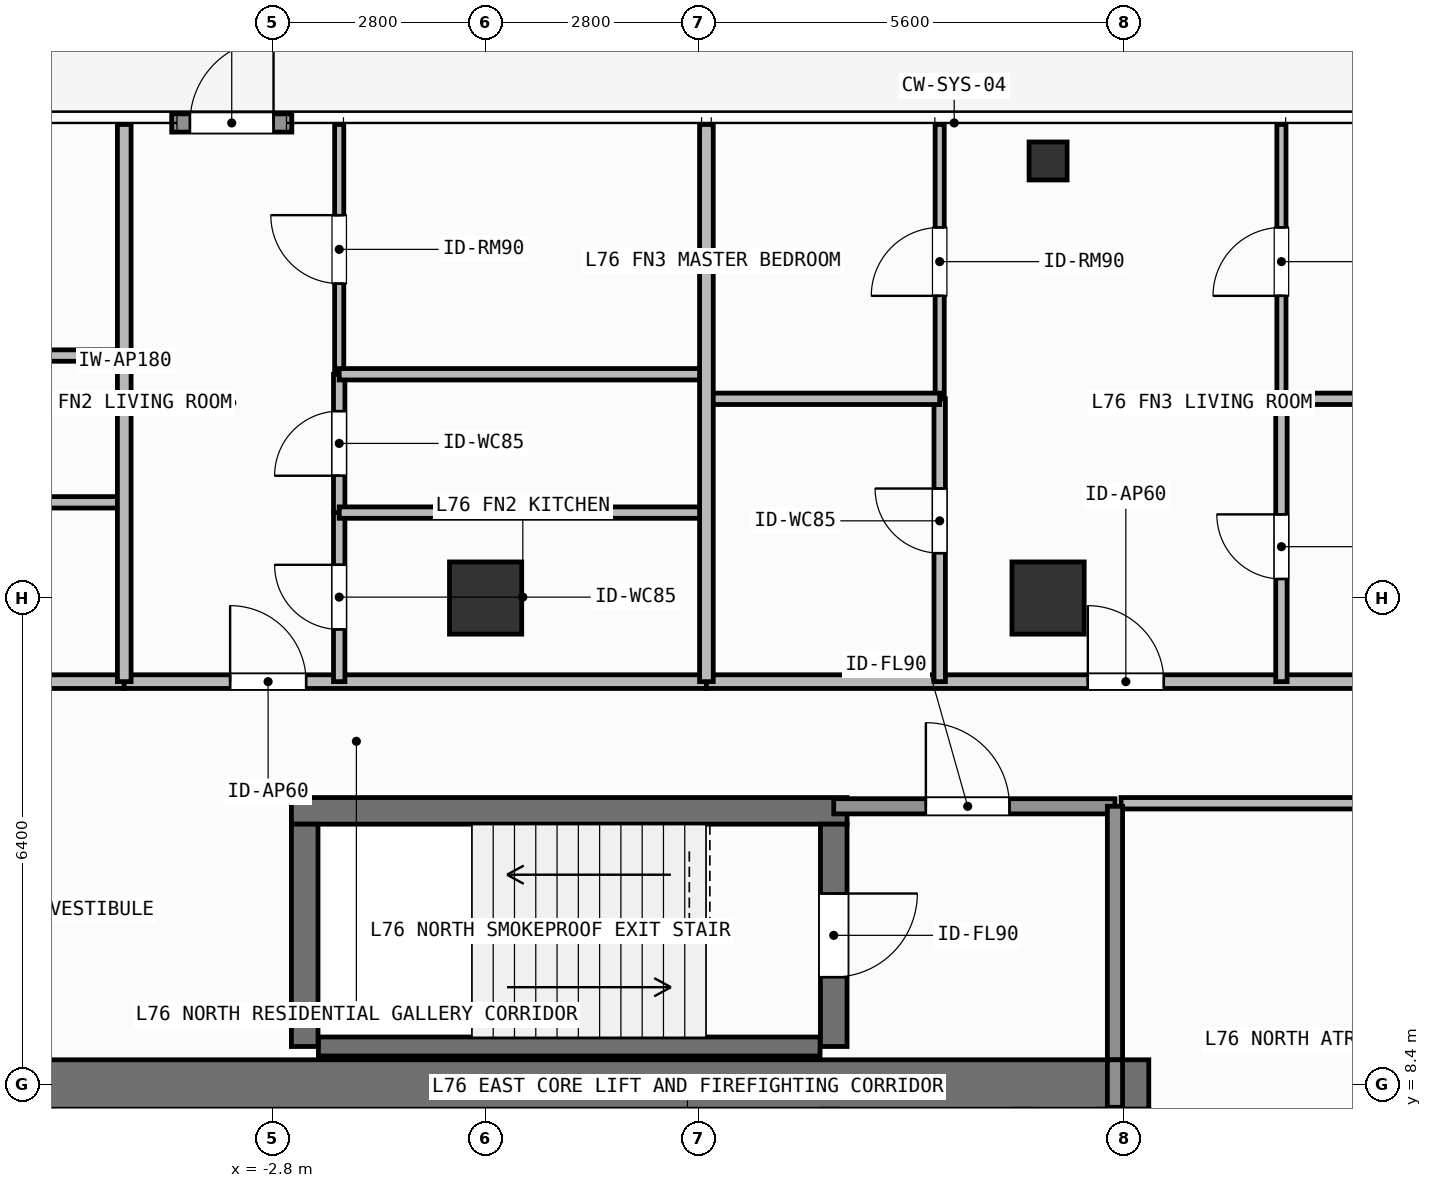
"""IFC4 building model, lengths in metres.
Left out: names, types, materials, properties, quantities, classifications, styles, units other than length and angle.
Written with IfcOpenShell. Run it as: python <this file> out.ifc"""

import sys

from ifc_helpers import new_model, si_unit, direction, frame, frame_2d, origin, origin_2d, place, context, subcontext, project, spatial, rectangle, hollow_rectangle, extrude, element, fill, save


model = new_model("IFC4")
c1 = context("Model", 3, precision=1e-05, world=origin(), true_north=direction((0.0, 1.0)))
c2 = subcontext(c1, "Body", "Model", "MODEL_VIEW")
j1 = project(units=[si_unit("LENGTHUNIT", "METRE"), si_unit("PLANEANGLEUNIT", "RADIAN")], contexts=[c1])
p1 = place(None, origin())
s1 = spatial("IfcSite", under=j1, at=p1, CompositionType="ELEMENT")
p2 = place(p1, origin())
s2 = spatial("IfcBuilding", under=s1, at=p2, CompositionType="ELEMENT")
p3 = place(p2, frame((0.0, 0.0, 309.3)))
s3 = spatial("IfcBuildingStorey", under=s2, at=p3, CompositionType="ELEMENT", Elevation=309.3)
p4 = place(p3, frame((-7.55, 8.4, 0.0), z_axis=(0.0, 0.0, 1.0), x_axis=(1.0, 0.0, 0.0)))
e1 = element("IfcWall", 1, at=p4, inside=s3, PredefinedType="SHEAR", context=c2, shape_type="SweptSolid", body=[
    extrude(rectangle(XDim=16.275, YDim=0.65, at=frame_2d((8.138, 0.0))), origin(), (0.0, 0.0, 1.0), 3.9),
])
p5 = place(p3, frame((-2.555, 12.0, 0.0), z_axis=(0.0, 0.0, 1.0), x_axis=(1.0, 0.0, 0.0)))
e2 = element("IfcWall", 2, at=p5, inside=s3, PredefinedType="SHEAR", context=c2, shape_type="SweptSolid", body=[
    extrude(rectangle(XDim=7.31, YDim=0.35, at=frame_2d((3.655, 0.0))), origin(), (0.0, 0.0, 1.0), 3.9),
])
p6 = place(p3, frame((-2.2, 8.9, 0.0), z_axis=(0.0, 0.0, 1.0), x_axis=(1.0, 0.0, 0.0)))
e3 = element("IfcWall", 3, at=p6, inside=s3, PredefinedType="SHEAR", context=c2, shape_type="SweptSolid", body=[
    extrude(rectangle(XDim=6.6, YDim=0.25, at=frame_2d((3.3, 0.0))), origin(), (0.0, 0.0, 1.0), 3.9),
])
p7 = place(p3, frame((-2.38, 8.9, 0.0), z_axis=(0.0, 0.0, 1.0), x_axis=(0.0, 1.0, 0.0)))
e4 = element("IfcWall", 4, at=p7, inside=s3, PredefinedType="SHEAR", context=c2, shape_type="SweptSolid", body=[
    extrude(rectangle(XDim=2.925, YDim=0.35, at=frame_2d((1.462, 0.0))), origin(), (0.0, 0.0, 1.0), 3.9),
])
p8 = place(p3, frame((4.58, 11.825, 0.0), z_axis=(0.0, 0.0, 1.0), x_axis=(0.0, -1.0, 0.0)))
e5 = element("IfcWall", 5, at=p8, inside=s3, PredefinedType="SHEAR", context=c2, shape_type="SweptSolid", body=[
    extrude(rectangle(XDim=2.925, YDim=0.35, at=frame_2d((1.462, 0.0))), origin(), (0.0, 0.0, 1.0), 3.9),
])
p9 = place(p8, frame((0.913, 0.0, 0.0)))
e6 = element("IfcOpeningElement", 6, at=p9, cuts=e5, PredefinedType="OPENING", context=c2, shape_type="SweptSolid", body=[
    extrude(rectangle(XDim=1.1, YDim=2.15, at=frame_2d((0.55, 1.075))), frame((0.0, 0.185, 0.0), z_axis=(0.0, -1.0, 0.0), x_axis=(1.0, 0.0, 0.0)), (0.0, 0.0, 1.0), 0.37),
])
for number, where, z_axis, x_axis in (
    (7, (0.0, 14.8, 0.0), (0.0, 0.0, 1.0), (1.0, 0.0, 0.0)),
    (8, (7.4, 14.8, 0.0), (0.0, 0.0, 1.0), (1.0, 0.0, 0.0)),
):
    element("IfcColumn", number, at=place(p3, frame(where, z_axis=z_axis, x_axis=x_axis)), inside=s3, PredefinedType="COLUMN", context=c2, shape_type="SweptSolid", body=[
        extrude(rectangle(XDim=0.95, YDim=0.95, at=origin_2d()), origin(), (0.0, 0.0, 1.0), 3.9),
    ])
p10 = place(p3, frame((7.4, 20.55, 0.0), z_axis=(0.0, 0.0, 1.0), x_axis=(1.0, 0.0, 0.0)))
e9 = element("IfcColumn", 9, at=p10, inside=s3, PredefinedType="COLUMN", context=c2, shape_type="SweptSolid", body=[
    extrude(hollow_rectangle(XDim=0.5, YDim=0.5, WallThickness=0.025, at=origin_2d()), origin(), (0.0, 0.0, 1.0), 3.9),
])
p11 = place(p3, frame((-4.13, 21.05, 0.0), z_axis=(0.0, 0.0, 1.0), x_axis=(1.0, 0.0, 0.0)))
e10 = element("IfcWall", 10, at=p11, inside=s3, PredefinedType="SOLIDWALL", context=c2, shape_type="SweptSolid", body=[
    extrude(rectangle(XDim=1.58, YDim=0.24, at=frame_2d((0.79, 0.0))), origin(), (0.0, 0.0, 1.0), 3.64),
])
p12 = place(p11, frame((0.24, 0.0, 0.0)))
e11 = element("IfcOpeningElement", 11, at=p12, cuts=e10, PredefinedType="OPENING", context=c2, shape_type="SweptSolid", body=[
    extrude(rectangle(XDim=1.1, YDim=2.2, at=frame_2d((0.55, 1.1))), frame((0.0, 0.13, 0.0), z_axis=(0.0, -1.0, 0.0), x_axis=(1.0, 0.0, 0.0)), (0.0, 0.0, 1.0), 0.26),
])
p13 = place(p3, frame((4.58, 12.06, 0.0), z_axis=(0.0, 0.0, 1.0), x_axis=(1.0, 0.0, 0.0)))
e12 = element("IfcWall", 12, at=p13, inside=s3, PredefinedType="SOLIDWALL", context=c2, shape_type="SweptSolid", body=[
    extrude(rectangle(XDim=3.7, YDim=0.2, at=frame_2d((1.85, 0.0))), origin(), (0.0, 0.0, 1.0), 3.64),
])
p14 = place(p13, frame((1.212, 0.0, 0.0)))
e13 = element("IfcOpeningElement", 13, at=p14, cuts=e12, PredefinedType="OPENING", context=c2, shape_type="SweptSolid", body=[
    extrude(rectangle(XDim=1.1, YDim=2.15, at=frame_2d((0.55, 1.075))), frame((0.0, 0.11, 0.0), z_axis=(0.0, -1.0, 0.0), x_axis=(1.0, 0.0, 0.0)), (0.0, 0.0, 1.0), 0.22),
])
p15 = place(p3, frame((8.36, 12.1, 0.0), z_axis=(0.0, 0.0, 1.0), x_axis=(1.0, 0.0, 0.0)))
e14 = element("IfcWall", 14, at=p15, inside=s3, PredefinedType="PARTITIONING", context=c2, shape_type="SweptSolid", body=[
    extrude(rectangle(XDim=7.22, YDim=0.15, at=frame_2d((3.61, 0.0))), origin(), (0.0, 0.0, 1.0), 3.64),
])
p16 = place(p15, frame((3.513, 0.0, 0.0)))
e15 = element("IfcOpeningElement", 15, at=p16, cuts=e14, PredefinedType="OPENING", context=c2, shape_type="SweptSolid", body=[
    extrude(rectangle(XDim=0.9, YDim=2.1, at=frame_2d((0.45, 1.05))), frame((0.0, 0.085, 0.0), z_axis=(0.0, -1.0, 0.0), x_axis=(1.0, 0.0, 0.0)), (0.0, 0.0, 1.0), 0.17),
])
p17 = place(p3, frame((-19.32, 13.7, 0.0), z_axis=(0.0, 0.0, 1.0), x_axis=(1.0, 0.0, 0.0)))
e16 = element("IfcWall", 16, at=p17, inside=s3, PredefinedType="PARTITIONING", context=c2, shape_type="SweptSolid", body=[
    extrude(rectangle(XDim=14.566, YDim=0.18, at=frame_2d((7.283, 0.0))), origin(), (0.0, 0.0, 1.0), 3.64),
])
p18 = place(p17, frame((2.845, 0.0, 0.0)))
e17 = element("IfcOpeningElement", 17, at=p18, cuts=e16, PredefinedType="OPENING", context=c2, shape_type="SweptSolid", body=[
    extrude(rectangle(XDim=1.0, YDim=2.2, at=frame_2d((0.5, 1.1))), frame((0.0, 0.1, 0.0), z_axis=(0.0, -1.0, 0.0), x_axis=(1.0, 0.0, 0.0)), (0.0, 0.0, 1.0), 0.2),
])
p19 = place(p3, frame((-4.754, 13.7, 0.0), z_axis=(0.0, 0.0, 1.0), x_axis=(1.0, 0.0, 0.0)))
e18 = element("IfcWall", 18, at=p19, inside=s3, PredefinedType="PARTITIONING", context=c2, shape_type="SweptSolid", body=[
    extrude(rectangle(XDim=7.659, YDim=0.18, at=frame_2d((3.83, 0.0))), origin(), (0.0, 0.0, 1.0), 3.64),
])
p20 = place(p19, frame((1.393, 0.0, 0.0)))
e19 = element("IfcOpeningElement", 19, at=p20, cuts=e18, PredefinedType="OPENING", context=c2, shape_type="SweptSolid", body=[
    extrude(rectangle(XDim=1.0, YDim=2.2, at=frame_2d((0.5, 1.1))), frame((0.0, 0.1, 0.0), z_axis=(0.0, -1.0, 0.0), x_axis=(1.0, 0.0, 0.0)), (0.0, 0.0, 1.0), 0.2),
])
p21 = place(p3, frame((-1.926, 13.7, 0.0), z_axis=(0.0, 0.0, 1.0), x_axis=(0.0, 1.0, 0.0)))
e20 = element("IfcWall", 20, at=p21, inside=s3, PredefinedType="PARTITIONING", context=c2, shape_type="SweptSolid", body=[
    extrude(rectangle(XDim=2.224, YDim=0.15, at=frame_2d((1.112, 0.0))), origin(), (0.0, 0.0, 1.0), 3.64),
])
p22 = place(p21, frame((0.687, 0.0, 0.0)))
e21 = element("IfcOpeningElement", 21, at=p22, cuts=e20, PredefinedType="OPENING", context=c2, shape_type="SweptSolid", body=[
    extrude(rectangle(XDim=0.85, YDim=2.1, at=frame_2d((0.425, 1.05))), frame((0.0, 0.085, 0.0), z_axis=(0.0, -1.0, 0.0), x_axis=(1.0, 0.0, 0.0)), (0.0, 0.0, 1.0), 0.17),
])
p23 = place(p3, frame((-1.926, 15.924, 0.0), z_axis=(0.0, 0.0, 1.0), x_axis=(0.0, 1.0, 0.0)))
e22 = element("IfcWall", 22, at=p23, inside=s3, PredefinedType="PARTITIONING", context=c2, shape_type="SweptSolid", body=[
    extrude(rectangle(XDim=1.82, YDim=0.15, at=frame_2d((0.91, 0.0))), origin(), (0.0, 0.0, 1.0), 3.64),
])
p24 = place(p23, frame((0.485, 0.0, 0.0)))
e23 = element("IfcOpeningElement", 23, at=p24, cuts=e22, PredefinedType="OPENING", context=c2, shape_type="SweptSolid", body=[
    extrude(rectangle(XDim=0.85, YDim=2.1, at=frame_2d((0.425, 1.05))), frame((0.0, 0.085, 0.0), z_axis=(0.0, -1.0, 0.0), x_axis=(1.0, 0.0, 0.0)), (0.0, 0.0, 1.0), 0.17),
])
p25 = place(p3, frame((-1.926, 17.744, 0.0), z_axis=(0.0, 0.0, 1.0), x_axis=(0.0, 1.0, 0.0)))
e24 = element("IfcWall", 24, at=p25, inside=s3, PredefinedType="PARTITIONING", context=c2, shape_type="SweptSolid", body=[
    extrude(rectangle(XDim=3.286, YDim=0.12, at=frame_2d((1.643, 0.0))), origin(), (0.0, 0.0, 1.0), 3.64),
])
p26 = place(p25, frame((1.193, 0.0, 0.0)))
e25 = element("IfcOpeningElement", 25, at=p26, cuts=e24, PredefinedType="OPENING", context=c2, shape_type="SweptSolid", body=[
    extrude(rectangle(XDim=0.9, YDim=2.1, at=frame_2d((0.45, 1.05))), frame((0.0, 0.07, 0.0), z_axis=(0.0, -1.0, 0.0), x_axis=(1.0, 0.0, 0.0)), (0.0, 0.0, 1.0), 0.14),
])
p27 = place(p3, frame((2.905, 13.7, 0.0), z_axis=(0.0, 0.0, 1.0), x_axis=(1.0, 0.0, 0.0)))
e26 = element("IfcWall", 26, at=p27, inside=s3, PredefinedType="PARTITIONING", context=c2, shape_type="SweptSolid", body=[
    extrude(rectangle(XDim=13.015, YDim=0.18, at=frame_2d((6.507, 0.0))), origin(), (0.0, 0.0, 1.0), 3.64),
])
p28 = place(p27, frame((5.018, 0.0, 0.0)))
e27 = element("IfcOpeningElement", 27, at=p28, cuts=e26, PredefinedType="OPENING", context=c2, shape_type="SweptSolid", body=[
    extrude(rectangle(XDim=1.0, YDim=2.2, at=frame_2d((0.5, 1.1))), frame((0.0, 0.1, 0.0), z_axis=(0.0, -1.0, 0.0), x_axis=(1.0, 0.0, 0.0)), (0.0, 0.0, 1.0), 0.2),
])
p29 = place(p3, frame((5.974, 13.7, 0.0), z_axis=(0.0, 0.0, 1.0), x_axis=(0.0, 1.0, 0.0)))
e28 = element("IfcWall", 28, at=p29, inside=s3, PredefinedType="PARTITIONING", context=c2, shape_type="SweptSolid", body=[
    extrude(rectangle(XDim=3.721, YDim=0.15, at=frame_2d((1.86, 0.0))), origin(), (0.0, 0.0, 1.0), 3.64),
])
p30 = place(p29, frame((1.691, 0.0, 0.0)))
e29 = element("IfcOpeningElement", 29, at=p30, cuts=e28, PredefinedType="OPENING", context=c2, shape_type="SweptSolid", body=[
    extrude(rectangle(XDim=0.85, YDim=2.1, at=frame_2d((0.425, 1.05))), frame((0.0, 0.085, 0.0), z_axis=(0.0, -1.0, 0.0), x_axis=(1.0, 0.0, 0.0)), (0.0, 0.0, 1.0), 0.17),
])
p31 = place(p3, frame((5.974, 17.421, 0.0), z_axis=(0.0, 0.0, 1.0), x_axis=(0.0, 1.0, 0.0)))
e30 = element("IfcWall", 30, at=p31, inside=s3, PredefinedType="PARTITIONING", context=c2, shape_type="SweptSolid", body=[
    extrude(rectangle(XDim=3.609, YDim=0.12, at=frame_2d((1.805, 0.0))), origin(), (0.0, 0.0, 1.0), 3.64),
])
p32 = place(p31, frame((1.354, 0.0, 0.0)))
e31 = element("IfcOpeningElement", 31, at=p32, cuts=e30, PredefinedType="OPENING", context=c2, shape_type="SweptSolid", body=[
    extrude(rectangle(XDim=0.9, YDim=2.1, at=frame_2d((0.45, 1.05))), frame((0.0, 0.07, 0.0), z_axis=(0.0, -1.0, 0.0), x_axis=(1.0, 0.0, 0.0)), (0.0, 0.0, 1.0), 0.14),
])
p33 = place(p3, frame((10.47, 13.7, 0.0), z_axis=(0.0, 0.0, 1.0), x_axis=(0.0, 1.0, 0.0)))
e32 = element("IfcWall", 32, at=p33, inside=s3, PredefinedType="PARTITIONING", context=c2, shape_type="SweptSolid", body=[
    extrude(rectangle(XDim=3.721, YDim=0.15, at=frame_2d((1.86, 0.0))), origin(), (0.0, 0.0, 1.0), 3.64),
])
p34 = place(p33, frame((1.351, 0.0, 0.0)))
e33 = element("IfcOpeningElement", 33, at=p34, cuts=e32, PredefinedType="OPENING", context=c2, shape_type="SweptSolid", body=[
    extrude(rectangle(XDim=0.85, YDim=2.1, at=frame_2d((0.425, 1.05))), frame((0.0, 0.085, 0.0), z_axis=(0.0, -1.0, 0.0), x_axis=(1.0, 0.0, 0.0)), (0.0, 0.0, 1.0), 0.17),
])
p35 = place(p3, frame((10.47, 17.421, 0.0), z_axis=(0.0, 0.0, 1.0), x_axis=(0.0, 1.0, 0.0)))
e34 = element("IfcWall", 34, at=p35, inside=s3, PredefinedType="PARTITIONING", context=c2, shape_type="SweptSolid", body=[
    extrude(rectangle(XDim=3.609, YDim=0.12, at=frame_2d((1.805, 0.0))), origin(), (0.0, 0.0, 1.0), 3.64),
])
p36 = place(p35, frame((1.354, 0.0, 0.0)))
e35 = element("IfcOpeningElement", 35, at=p36, cuts=e34, PredefinedType="OPENING", context=c2, shape_type="SweptSolid", body=[
    extrude(rectangle(XDim=0.9, YDim=2.1, at=frame_2d((0.45, 1.05))), frame((0.0, 0.07, 0.0), z_axis=(0.0, -1.0, 0.0), x_axis=(1.0, 0.0, 0.0)), (0.0, 0.0, 1.0), 0.14),
])
p37 = place(p3, frame((8.28, 8.725, 0.0), z_axis=(0.0, 0.0, 1.0), x_axis=(0.0, 1.0, 0.0)))
e36 = element("IfcWall", 36, at=p37, inside=s3, PredefinedType="SOLIDWALL", context=c2, shape_type="SweptSolid", body=[
    extrude(rectangle(XDim=3.335, YDim=0.2, at=frame_2d((1.667, 0.0))), origin(), (0.0, 0.0, 1.0), 3.64),
])
p38 = place(p3, frame((8.28, 8.1, 0.0), z_axis=(0.0, 0.0, 1.0), x_axis=(0.0, 1.0, 0.0)))
e37 = element("IfcWall", 37, at=p38, inside=s3, PredefinedType="SOLIDWALL", context=c2, shape_type="SweptSolid", body=[
    extrude(rectangle(XDim=0.625, YDim=0.2, at=frame_2d((0.312, 0.0))), origin(), (0.0, 0.0, 1.0), 3.64),
])
for number, where, z_axis, x_axis in (
    (38, (-12.328, 16.059, 0.0), (0.0, 0.0, 1.0), (1.0, 0.0, 0.0)),
    (39, (-12.328, 17.99, 0.0), (0.0, 0.0, 1.0), (1.0, 0.0, 0.0)),
):
    element("IfcWall", number, at=place(p3, frame(where, z_axis=z_axis, x_axis=x_axis)), inside=s3, PredefinedType="PARTITIONING", context=c2, shape_type="SweptSolid", body=[
        extrude(rectangle(XDim=7.574, YDim=0.15, at=frame_2d((3.787, 0.0))), origin(), (0.0, 0.0, 1.0), 3.64),
    ])
p39 = place(p3, frame((-1.926, 15.924, 0.0), z_axis=(0.0, 0.0, 1.0), x_axis=(1.0, 0.0, 0.0)))
e40 = element("IfcWall", 40, at=p39, inside=s3, PredefinedType="PARTITIONING", context=c2, shape_type="SweptSolid", body=[
    extrude(rectangle(XDim=4.831, YDim=0.15, at=frame_2d((2.416, 0.0))), origin(), (0.0, 0.0, 1.0), 3.64),
])
p40 = place(p3, frame((-1.926, 17.744, 0.0), z_axis=(0.0, 0.0, 1.0), x_axis=(1.0, 0.0, 0.0)))
e41 = element("IfcWall", 41, at=p40, inside=s3, PredefinedType="PARTITIONING", context=c2, shape_type="SweptSolid", body=[
    extrude(rectangle(XDim=4.831, YDim=0.15, at=frame_2d((2.416, 0.0))), origin(), (0.0, 0.0, 1.0), 3.33),
])
p41 = place(p3, frame((-4.754, 13.7, 0.0), z_axis=(0.0, 0.0, 1.0), x_axis=(0.0, 1.0, 0.0)))
e42 = element("IfcWall", 42, at=p41, inside=s3, PredefinedType="PARTITIONING", context=c2, shape_type="SweptSolid", body=[
    extrude(rectangle(XDim=7.33, YDim=0.18, at=frame_2d((3.665, 0.0))), origin(), (0.0, 0.0, 1.0), 3.64),
])
p42 = place(p3, frame((2.905, 17.421, 0.0), z_axis=(0.0, 0.0, 1.0), x_axis=(1.0, 0.0, 0.0)))
e43 = element("IfcWall", 43, at=p42, inside=s3, PredefinedType="PARTITIONING", context=c2, shape_type="SweptSolid", body=[
    extrude(rectangle(XDim=3.069, YDim=0.15, at=frame_2d((1.535, 0.0))), origin(), (0.0, 0.0, 1.0), 3.33),
])
p43 = place(p3, frame((10.47, 17.421, 0.0), z_axis=(0.0, 0.0, 1.0), x_axis=(1.0, 0.0, 0.0)))
e44 = element("IfcWall", 44, at=p43, inside=s3, PredefinedType="PARTITIONING", context=c2, shape_type="SweptSolid", body=[
    extrude(rectangle(XDim=5.45, YDim=0.15, at=frame_2d((2.725, 0.0))), origin(), (0.0, 0.0, 1.0), 3.33),
])
p44 = place(p3, frame((2.905, 13.7, 0.0), z_axis=(0.0, 0.0, 1.0), x_axis=(0.0, 1.0, 0.0)))
e45 = element("IfcWall", 45, at=p44, inside=s3, PredefinedType="PARTITIONING", context=c2, shape_type="SweptSolid", body=[
    extrude(rectangle(XDim=7.33, YDim=0.18, at=frame_2d((3.665, 0.0))), origin(), (0.0, 0.0, 1.0), 3.64),
])
p45 = place(p12, origin())
e46 = element("IfcDoor", 46, at=p45, inside=s3, OperationType="SINGLE_SWING_RIGHT", PredefinedType="DOOR", context=c2, shape_type="SweptSolid", body=[
    extrude(rectangle(XDim=1.1, YDim=2.2, at=frame_2d((0.55, 1.1))), frame((0.0, 0.025, 0.0), z_axis=(0.0, -1.0, 0.0), x_axis=(1.0, 0.0, 0.0)), (0.0, 0.0, 1.0), 0.05),
])
fill(e11, e46)
p46 = place(p9, origin())
e47 = element("IfcDoor", 47, at=p46, inside=s3, OperationType="SINGLE_SWING_LEFT", PredefinedType="DOOR", context=c2, shape_type="SweptSolid", body=[
    extrude(rectangle(XDim=1.1, YDim=2.15, at=frame_2d((0.55, 1.075))), frame((0.0, 0.025, 0.0), z_axis=(0.0, -1.0, 0.0), x_axis=(1.0, 0.0, 0.0)), (0.0, 0.0, 1.0), 0.05),
])
fill(e6, e47)
p47 = place(p14, origin())
e48 = element("IfcDoor", 48, at=p47, inside=s3, OperationType="SINGLE_SWING_LEFT", PredefinedType="DOOR", context=c2, shape_type="SweptSolid", body=[
    extrude(rectangle(XDim=1.1, YDim=2.15, at=frame_2d((0.55, 1.075))), frame((0.0, 0.025, 0.0), z_axis=(0.0, -1.0, 0.0), x_axis=(1.0, 0.0, 0.0)), (0.0, 0.0, 1.0), 0.05),
])
fill(e13, e48)
p48 = place(p20, origin())
e49 = element("IfcDoor", 49, at=p48, inside=s3, OperationType="SINGLE_SWING_LEFT", PredefinedType="DOOR", context=c2, shape_type="SweptSolid", body=[
    extrude(rectangle(XDim=1.0, YDim=2.2, at=frame_2d((0.5, 1.1))), frame((0.0, 0.025, 0.0), z_axis=(0.0, -1.0, 0.0), x_axis=(1.0, 0.0, 0.0)), (0.0, 0.0, 1.0), 0.05),
])
fill(e19, e49)
p49 = place(p22, origin())
e50 = element("IfcDoor", 50, at=p49, inside=s3, OperationType="SINGLE_SWING_RIGHT", PredefinedType="DOOR", context=c2, shape_type="SweptSolid", body=[
    extrude(rectangle(XDim=0.85, YDim=2.1, at=frame_2d((0.425, 1.05))), frame((0.0, 0.025, 0.0), z_axis=(0.0, -1.0, 0.0), x_axis=(1.0, 0.0, 0.0)), (0.0, 0.0, 1.0), 0.05),
])
fill(e21, e50)
p50 = place(p24, origin())
e51 = element("IfcDoor", 51, at=p50, inside=s3, OperationType="SINGLE_SWING_LEFT", PredefinedType="DOOR", context=c2, shape_type="SweptSolid", body=[
    extrude(rectangle(XDim=0.85, YDim=2.1, at=frame_2d((0.425, 1.05))), frame((0.0, 0.025, 0.0), z_axis=(0.0, -1.0, 0.0), x_axis=(1.0, 0.0, 0.0)), (0.0, 0.0, 1.0), 0.05),
])
fill(e23, e51)
p51 = place(p26, origin())
e52 = element("IfcDoor", 52, at=p51, inside=s3, OperationType="SINGLE_SWING_RIGHT", PredefinedType="DOOR", context=c2, shape_type="SweptSolid", body=[
    extrude(rectangle(XDim=0.9, YDim=2.1, at=frame_2d((0.45, 1.05))), frame((0.0, 0.025, 0.0), z_axis=(0.0, -1.0, 0.0), x_axis=(1.0, 0.0, 0.0)), (0.0, 0.0, 1.0), 0.05),
])
fill(e25, e52)
p52 = place(p28, origin())
e53 = element("IfcDoor", 53, at=p52, inside=s3, OperationType="SINGLE_SWING_LEFT", PredefinedType="DOOR", context=c2, shape_type="SweptSolid", body=[
    extrude(rectangle(XDim=1.0, YDim=2.2, at=frame_2d((0.5, 1.1))), frame((0.0, 0.025, 0.0), z_axis=(0.0, -1.0, 0.0), x_axis=(1.0, 0.0, 0.0)), (0.0, 0.0, 1.0), 0.05),
])
fill(e27, e53)
p53 = place(p30, origin())
e54 = element("IfcDoor", 54, at=p53, inside=s3, OperationType="SINGLE_SWING_RIGHT", PredefinedType="DOOR", context=c2, shape_type="SweptSolid", body=[
    extrude(rectangle(XDim=0.85, YDim=2.1, at=frame_2d((0.425, 1.05))), frame((0.0, 0.025, 0.0), z_axis=(0.0, -1.0, 0.0), x_axis=(1.0, 0.0, 0.0)), (0.0, 0.0, 1.0), 0.05),
])
fill(e29, e54)
p54 = place(p32, origin())
e55 = element("IfcDoor", 55, at=p54, inside=s3, OperationType="SINGLE_SWING_LEFT", PredefinedType="DOOR", context=c2, shape_type="SweptSolid", body=[
    extrude(rectangle(XDim=0.9, YDim=2.1, at=frame_2d((0.45, 1.05))), frame((0.0, 0.025, 0.0), z_axis=(0.0, -1.0, 0.0), x_axis=(1.0, 0.0, 0.0)), (0.0, 0.0, 1.0), 0.05),
])
fill(e31, e55)
p55 = place(p34, origin())
e56 = element("IfcDoor", 56, at=p55, inside=s3, OperationType="SINGLE_SWING_RIGHT", PredefinedType="DOOR", context=c2, shape_type="SweptSolid", body=[
    extrude(rectangle(XDim=0.85, YDim=2.1, at=frame_2d((0.425, 1.05))), frame((0.0, 0.025, 0.0), z_axis=(0.0, -1.0, 0.0), x_axis=(1.0, 0.0, 0.0)), (0.0, 0.0, 1.0), 0.05),
])
fill(e33, e56)
p56 = place(p36, origin())
e57 = element("IfcDoor", 57, at=p56, inside=s3, OperationType="SINGLE_SWING_LEFT", PredefinedType="DOOR", context=c2, shape_type="SweptSolid", body=[
    extrude(rectangle(XDim=0.9, YDim=2.1, at=frame_2d((0.45, 1.05))), frame((0.0, 0.025, 0.0), z_axis=(0.0, -1.0, 0.0), x_axis=(1.0, 0.0, 0.0)), (0.0, 0.0, 1.0), 0.05),
])
fill(e35, e57)
save(model, sys.argv[1])
